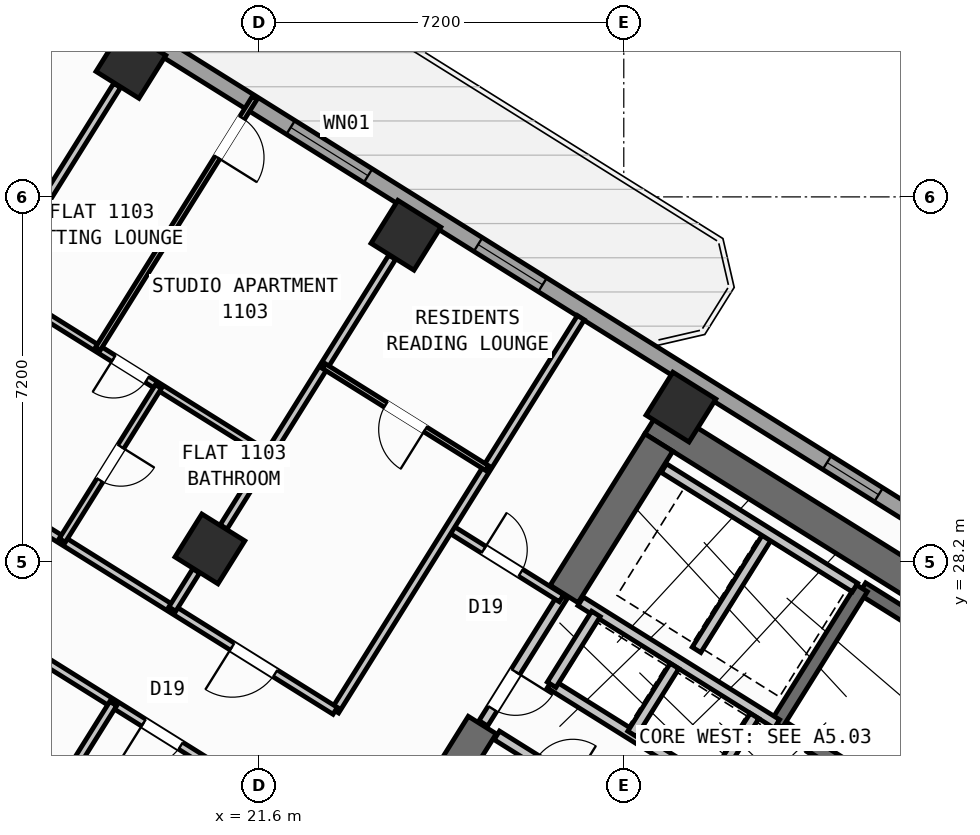
"""IFC4 building model, lengths in metres.
Left out: names, types, materials, properties, quantities, classifications, styles, units other than length and angle.
Written with IfcOpenShell. Run it as: python <this file> out.ifc"""

import sys

from ifc_helpers import new_model, si_unit, direction, frame, frame_2d, origin, origin_2d, place, context, subcontext, project, spatial, rectangle, hollow_rectangle, extrude, source, transform, mapped, element, fill, save


model = new_model("IFC4")
c1 = context("Model", 3, precision=1e-05, world=origin(), true_north=direction((0.0, 1.0)))
c2 = subcontext(c1, "Body", "Model", "MODEL_VIEW")
j1 = project(units=[si_unit("LENGTHUNIT", "METRE"), si_unit("PLANEANGLEUNIT", "RADIAN")], contexts=[c1])
p1 = place(None, origin())
s1 = spatial("IfcSite", under=j1, at=p1, CompositionType="ELEMENT")
p2 = place(p1, origin())
s2 = spatial("IfcBuilding", under=s1, at=p2, CompositionType="ELEMENT")
p3 = place(p2, frame((0.0, 0.0, 45.6)))
s3 = spatial("IfcBuildingStorey", under=s2, at=p3, CompositionType="ELEMENT", Elevation=45.6)
p4 = place(p3, frame((40.615, 23.983, 0.0), z_axis=(0.0, 0.0, 1.0), x_axis=(-0.848045953968, 0.529922692436, 0.0)))
e1 = element("IfcWall", 1, at=p4, inside=s3, PredefinedType="SHEAR", context=c2, shape_type="SweptSolid", body=[
    extrude(rectangle(XDim=13.24, YDim=0.65, at=frame_2d((6.62, 0.0))), origin(), (0.0, 0.0, 1.0), 3.35),
])
p5 = place(p3, frame((29.491, 30.552, 0.0), z_axis=(0.0, 0.0, 1.0), x_axis=(-0.529893103397, -0.8480644427, 0.0)))
e2 = element("IfcWall", 2, at=p5, inside=s3, PredefinedType="SHEAR", context=c2, shape_type="SweptSolid", body=[
    extrude(rectangle(XDim=3.525, YDim=0.65, at=frame_2d((1.763, 0.0))), origin(), (0.0, 0.0, 1.0), 3.35),
])
p6 = place(p3, frame((26.007, 24.976, 0.0), z_axis=(0.0, 0.0, 1.0), x_axis=(-0.529916319127, -0.848049936456, 0.0)))
e3 = element("IfcWall", 3, at=p6, inside=s3, PredefinedType="SHEAR", context=c2, shape_type="SweptSolid", body=[
    extrude(rectangle(XDim=6.375, YDim=0.65, at=frame_2d((3.188, 0.0))), origin(), (0.0, 0.0, 1.0), 3.35),
])
m1 = source(origin(), c2, "Body", "SweptSolid", [
    extrude(hollow_rectangle(XDim=1.0, YDim=1.0, WallThickness=0.04, at=origin_2d()), origin(), (0.0, 0.0, 1.0), 3.6),
])
for number, where, z_axis, x_axis in (
    (4, (29.928, 31.251, 0.0), (0.0, 0.0, 1.0), (-0.848, 0.53, 0.0)),
    (5, (24.5, 34.643, 0.0), (0.0, 0.0, 1.0), (-0.848, 0.53, 0.0)),
    (6, (20.632, 28.452, 0.0), (0.0, 0.0, 1.0), (-0.848, 0.53, 0.0)),
    (7, (19.073, 38.034, 0.0), (0.0, 0.0, 1.0), (-0.848, 0.53, 0.0)),
):
    element("IfcColumn", number, at=place(p3, frame(where, z_axis=z_axis, x_axis=x_axis)), inside=s3, PredefinedType="COLUMN", context=c2, shape_type="MappedRepresentation", body=[
        mapped(m1, transform((0.0, 0.0, 0.0), scale=1.0)),
    ])
p7 = place(p3, frame((14.138, 41.825, 0.0), z_axis=(0.0, 0.0, 1.0), x_axis=(0.848046498049, -0.529921821731, 0.0)))
e8 = element("IfcWall", 8, at=p7, inside=s3, PredefinedType="STANDARD", context=c2, shape_type="SweptSolid", body=[
    extrude(rectangle(XDim=31.588, YDim=0.32, at=frame_2d((15.794, 0.0))), origin(), (0.0, 0.0, 1.0), 3.35),
])
p8 = place(p7, frame((3.159, 0.0, 0.0)))
e9 = element("IfcOpeningElement", 9, at=p8, cuts=e8, PredefinedType="OPENING", context=c2, shape_type="SweptSolid", body=[
    extrude(rectangle(XDim=1.05, YDim=2.15, at=frame_2d((0.525, 1.075))), frame((0.0, 0.17, 0.0), z_axis=(0.0, -1.0, 0.0), x_axis=(1.0, 0.0, 0.0)), (0.0, 0.0, 1.0), 0.34),
])
p9 = place(p7, frame((0.906, 0.0, 1.0)))
e10 = element("IfcOpeningElement", 10, at=p9, cuts=e8, PredefinedType="OPENING", context=c2, shape_type="SweptSolid", body=[
    extrude(rectangle(XDim=0.9, YDim=1.25, at=frame_2d((0.45, 0.625))), frame((0.0, 0.17, 0.0), z_axis=(0.0, -1.0, 0.0), x_axis=(1.0, 0.0, 0.0)), (0.0, 0.0, 1.0), 0.34),
])
p10 = place(p7, frame((9.537, 0.0, 0.85)))
e11 = element("IfcOpeningElement", 11, at=p10, cuts=e8, PredefinedType="OPENING", context=c2, shape_type="SweptSolid", body=[
    extrude(rectangle(XDim=1.8, YDim=1.5, at=frame_2d((0.9, 0.75))), frame((0.0, 0.17, 0.0), z_axis=(0.0, -1.0, 0.0), x_axis=(1.0, 0.0, 0.0)), (0.0, 0.0, 1.0), 0.34),
])
p11 = place(p7, frame((13.899, 0.0, 0.85)))
e12 = element("IfcOpeningElement", 12, at=p11, cuts=e8, PredefinedType="OPENING", context=c2, shape_type="SweptSolid", body=[
    extrude(rectangle(XDim=1.5, YDim=1.5, at=frame_2d((0.75, 0.75))), frame((0.0, 0.17, 0.0), z_axis=(0.0, -1.0, 0.0), x_axis=(1.0, 0.0, 0.0)), (0.0, 0.0, 1.0), 0.34),
])
p12 = place(p7, frame((22.019, 0.0, 0.95)))
e13 = element("IfcOpeningElement", 13, at=p12, cuts=e8, PredefinedType="OPENING", context=c2, shape_type="SweptSolid", body=[
    extrude(rectangle(XDim=1.2, YDim=1.4, at=frame_2d((0.6, 0.7))), frame((0.0, 0.17, 0.0), z_axis=(0.0, -1.0, 0.0), x_axis=(1.0, 0.0, 0.0)), (0.0, 0.0, 1.0), 0.34),
])
p13 = place(p7, frame((27.569, 0.0, 0.95)))
e14 = element("IfcOpeningElement", 14, at=p13, cuts=e8, PredefinedType="OPENING", context=c2, shape_type="SweptSolid", body=[
    extrude(rectangle(XDim=1.2, YDim=1.4, at=frame_2d((0.6, 0.7))), frame((0.0, 0.17, 0.0), z_axis=(0.0, -1.0, 0.0), x_axis=(1.0, 0.0, 0.0)), (0.0, 0.0, 1.0), 0.34),
])
p14 = place(p3, frame((39.721, 23.788, 0.0), z_axis=(0.0, 0.0, 1.0), x_axis=(-0.848054434086, 0.529909121291, 0.0)))
e15 = element("IfcWall", 15, at=p14, inside=s3, PredefinedType="SHEAR", context=c2, shape_type="SweptSolid", body=[
    extrude(rectangle(XDim=7.33, YDim=0.26, at=frame_2d((3.665, 0.0))), origin(), (0.0, 0.0, 1.0), 3.35),
])
p15 = place(p3, frame((38.046, 21.108, 0.0), z_axis=(0.0, 0.0, 1.0), x_axis=(-0.848054434086, 0.529909121291, 0.0)))
e16 = element("IfcWall", 16, at=p15, inside=s3, PredefinedType="SHEAR", context=c2, shape_type="SweptSolid", body=[
    extrude(rectangle(XDim=7.33, YDim=0.26, at=frame_2d((3.665, 0.0))), origin(), (0.0, 0.0, 1.0), 3.35),
])
p16 = place(p15, frame((0.22, 0.0, 0.0)))
e17 = element("IfcOpeningElement", 17, at=p16, cuts=e16, PredefinedType="OPENING", context=c2, shape_type="SweptSolid", body=[
    extrude(rectangle(XDim=1.1, YDim=2.1, at=frame_2d((0.55, 1.05))), frame((0.0, 0.14, 0.0), z_axis=(0.0, -1.0, 0.0), x_axis=(1.0, 0.0, 0.0)), (0.0, 0.0, 1.0), 0.28),
])
p17 = place(p3, frame((33.496, 27.677, 0.0), z_axis=(0.0, 0.0, 1.0), x_axis=(-0.529908658664, -0.84805472316, 0.0)))
e18 = element("IfcWall", 18, at=p17, inside=s3, PredefinedType="SHEAR", context=c2, shape_type="SweptSolid", body=[
    extrude(rectangle(XDim=3.16, YDim=0.26, at=frame_2d((1.58, 0.0))), origin(), (0.0, 0.0, 1.0), 3.35),
])
p18 = place(p3, frame((31.822, 24.998, 0.0), z_axis=(0.0, 0.0, 1.0), x_axis=(-0.848058348634, 0.529902856485, 0.0)))
e19 = element("IfcWall", 19, at=p18, inside=s3, PredefinedType="STANDARD", context=c2, shape_type="SweptSolid", body=[
    extrude(rectangle(XDim=4.568, YDim=0.2, at=frame_2d((2.284, 0.0))), origin(), (0.0, 0.0, 1.0), 3.34),
])
p19 = place(p3, frame((32.108, 22.814, 0.0), z_axis=(0.0, 0.0, 1.0), x_axis=(-0.848042229521, 0.529928652696, 0.0)))
e20 = element("IfcWall", 20, at=p19, inside=s3, PredefinedType="STANDARD", context=c2, shape_type="SweptSolid", body=[
    extrude(rectangle(XDim=5.62, YDim=0.2, at=frame_2d((2.81, 0.0))), origin(), (0.0, 0.0, 1.0), 3.34),
])
p20 = place(p3, frame((28.25, 27.17, 0.0), z_axis=(0.0, 0.0, 1.0), x_axis=(-0.529905827651, -0.848056492117, 0.0)))
e21 = element("IfcWall", 21, at=p20, inside=s3, PredefinedType="STANDARD", context=c2, shape_type="SweptSolid", body=[
    extrude(rectangle(XDim=1.65, YDim=0.2, at=frame_2d((0.825, 0.0))), origin(), (0.0, 0.0, 1.0), 3.34),
])
p21 = place(p3, frame((31.645, 28.716, 0.0), z_axis=(0.0, 0.0, 1.0), x_axis=(-0.52986693015, -0.848080795876, 0.0)))
e22 = element("IfcWall", 22, at=p21, inside=s3, PredefinedType="STANDARD", context=c2, shape_type="SweptSolid", body=[
    extrude(rectangle(XDim=2.66, YDim=0.2, at=frame_2d((1.33, 0.0))), origin(), (0.0, 0.0, 1.0), 3.34),
])
p22 = place(p3, frame((33.363, 27.69, 0.0), z_axis=(0.0, 0.0, 1.0), x_axis=(-0.848053806312, 0.529910125964, 0.0)))
e23 = element("IfcWall", 23, at=p22, inside=s3, PredefinedType="STANDARD", context=c2, shape_type="SweptSolid", body=[
    extrude(rectangle(XDim=4.448, YDim=0.2, at=frame_2d((2.224, 0.0))), origin(), (0.0, 0.0, 1.0), 3.34),
])
for number, where, z_axis, x_axis in (
    (24, (31.379, 25.156, 0.0), (0.0, 0.0, 1.0), (-0.53, -0.848, 0.0)),
    (25, (29.801, 26.142, 0.0), (0.0, 0.0, 1.0), (-0.53, -0.848, 0.0)),
):
    element("IfcWall", number, at=place(p3, frame(where, z_axis=z_axis, x_axis=x_axis)), inside=s3, PredefinedType="STANDARD", context=c2, shape_type="SweptSolid", body=[
        extrude(rectangle(XDim=1.58, YDim=0.2, at=frame_2d((0.79, 0.0))), origin(), (0.0, 0.0, 1.0), 3.34),
    ])
p23 = place(p3, frame((31.525, 21.504, 0.0), z_axis=(0.0, 0.0, 1.0), x_axis=(-0.848044998614, 0.529924221305, 0.0)))
e26 = element("IfcWall", 26, at=p23, inside=s3, PredefinedType="STANDARD", context=c2, shape_type="SweptSolid", body=[
    extrude(rectangle(XDim=6.168, YDim=0.2, at=frame_2d((3.084, 0.0))), origin(), (0.0, 0.0, 1.0), 3.34),
])
p24 = place(p23, frame((4.4, 0.0, 0.0)))
e27 = element("IfcOpeningElement", 27, at=p24, cuts=e26, PredefinedType="OPENING", context=c2, shape_type="SweptSolid", body=[
    extrude(rectangle(XDim=0.86, YDim=2.05, at=frame_2d((0.43, 1.025))), frame((0.0, 0.11, 0.0), z_axis=(0.0, -1.0, 0.0), x_axis=(1.0, 0.0, 0.0)), (0.0, 0.0, 1.0), 0.22),
])
p25 = place(p23, frame((0.35, 0.0, 0.0)))
e28 = element("IfcOpeningElement", 28, at=p25, cuts=e26, PredefinedType="OPENING", context=c2, shape_type="SweptSolid", body=[
    extrude(rectangle(XDim=0.86, YDim=2.05, at=frame_2d((0.43, 1.025))), frame((0.0, 0.11, 0.0), z_axis=(0.0, -1.0, 0.0), x_axis=(1.0, 0.0, 0.0)), (0.0, 0.0, 1.0), 0.22),
])
p26 = place(p3, frame((27.596, 27.52, 0.0), z_axis=(0.0, 0.0, 1.0), x_axis=(-0.529865479138, -0.848081702443, 0.0)))
e29 = element("IfcWall", 29, at=p26, inside=s3, PredefinedType="STANDARD", context=c2, shape_type="SweptSolid", body=[
    extrude(rectangle(XDim=2.96, YDim=0.2, at=frame_2d((1.48, 0.0))), origin(), (0.0, 0.0, 1.0), 3.34),
])
p27 = place(p26, frame((1.76, 0.0, 0.0)))
e30 = element("IfcOpeningElement", 30, at=p27, cuts=e29, PredefinedType="OPENING", context=c2, shape_type="SweptSolid", body=[
    extrude(rectangle(XDim=0.86, YDim=2.05, at=frame_2d((0.43, 1.025))), frame((0.0, 0.11, 0.0), z_axis=(0.0, -1.0, 0.0), x_axis=(1.0, 0.0, 0.0)), (0.0, 0.0, 1.0), 0.22),
])
p28 = place(p3, frame((27.57, 27.478, 0.0), z_axis=(0.0, 0.0, 1.0), x_axis=(-0.848050851465, 0.529914854792, 0.0)))
e31 = element("IfcWall", 31, at=p28, inside=s3, PredefinedType="PARTITIONING", context=c2, shape_type="SweptSolid", body=[
    extrude(rectangle(XDim=2.61, YDim=0.16, at=frame_2d((1.305, 0.0))), origin(), (0.0, 0.0, 1.0), 3.34),
])
p29 = place(p28, frame((0.95, 0.0, 0.0)))
e32 = element("IfcOpeningElement", 32, at=p29, cuts=e31, PredefinedType="OPENING", context=c2, shape_type="SweptSolid", body=[
    extrude(rectangle(XDim=0.86, YDim=2.05, at=frame_2d((0.43, 1.025))), frame((0.0, 0.09, 0.0), z_axis=(0.0, -1.0, 0.0), x_axis=(1.0, 0.0, 0.0)), (0.0, 0.0, 1.0), 0.18),
])
p30 = place(p3, frame((27.953, 33.016, 0.0), z_axis=(0.0, 0.0, 1.0), x_axis=(-0.529903001606, -0.848058257957, 0.0)))
e33 = element("IfcWall", 33, at=p30, inside=s3, PredefinedType="PARTITIONING", context=c2, shape_type="SweptSolid", body=[
    extrude(rectangle(XDim=9.15, YDim=0.16, at=frame_2d((4.575, 0.0))), origin(), (0.0, 0.0, 1.0), 3.34),
])
p31 = place(p3, frame((23.104, 25.256, 0.0), z_axis=(0.0, 0.0, 1.0), x_axis=(-0.848041752158, 0.529929416617, 0.0)))
e34 = element("IfcWall", 34, at=p31, inside=s3, PredefinedType="PARTITIONING", context=c2, shape_type="SweptSolid", body=[
    extrude(rectangle(XDim=16.73, YDim=0.16, at=frame_2d((8.365, 0.0))), origin(), (0.0, 0.0, 1.0), 3.34),
])
p32 = place(p31, frame((1.395, 0.0, 0.0)))
e35 = element("IfcOpeningElement", 35, at=p32, cuts=e34, PredefinedType="OPENING", context=c2, shape_type="SweptSolid", body=[
    extrude(rectangle(XDim=1.0, YDim=2.1, at=frame_2d((0.5, 1.05))), frame((0.0, 0.09, 0.0), z_axis=(0.0, -1.0, 0.0), x_axis=(1.0, 0.0, 0.0)), (0.0, 0.0, 1.0), 0.18),
])
p33 = place(p31, frame((7.82, 0.0, 0.0)))
e36 = element("IfcOpeningElement", 36, at=p33, cuts=e34, PredefinedType="OPENING", context=c2, shape_type="SweptSolid", body=[
    extrude(rectangle(XDim=1.0, YDim=2.1, at=frame_2d((0.5, 1.05))), frame((0.0, 0.09, 0.0), z_axis=(0.0, -1.0, 0.0), x_axis=(1.0, 0.0, 0.0)), (0.0, 0.0, 1.0), 0.18),
])
p34 = place(p31, frame((14.76, 0.0, 0.0)))
e37 = element("IfcOpeningElement", 37, at=p34, cuts=e34, PredefinedType="OPENING", context=c2, shape_type="SweptSolid", body=[
    extrude(rectangle(XDim=1.0, YDim=2.1, at=frame_2d((0.5, 1.05))), frame((0.0, 0.09, 0.0), z_axis=(0.0, -1.0, 0.0), x_axis=(1.0, 0.0, 0.0)), (0.0, 0.0, 1.0), 0.18),
])
p35 = place(p3, frame((21.938, 23.391, 0.0), z_axis=(0.0, 0.0, 1.0), x_axis=(-0.848045850158, 0.529922858565, 0.0)))
e38 = element("IfcWall", 38, at=p35, inside=s3, PredefinedType="PARTITIONING", context=c2, shape_type="SweptSolid", body=[
    extrude(rectangle(XDim=16.73, YDim=0.16, at=frame_2d((8.365, 0.0))), origin(), (0.0, 0.0, 1.0), 3.34),
])
p36 = place(p35, frame((2.22, 0.0, 0.0)))
e39 = element("IfcOpeningElement", 39, at=p36, cuts=e38, PredefinedType="OPENING", context=c2, shape_type="SweptSolid", body=[
    extrude(rectangle(XDim=0.86, YDim=2.05, at=frame_2d((0.43, 1.025))), frame((0.0, 0.09, 0.0), z_axis=(0.0, -1.0, 0.0), x_axis=(1.0, 0.0, 0.0)), (0.0, 0.0, 1.0), 0.18),
])
p37 = place(p35, frame((6.49, 0.0, 0.0)))
e40 = element("IfcOpeningElement", 40, at=p37, cuts=e38, PredefinedType="OPENING", context=c2, shape_type="SweptSolid", body=[
    extrude(rectangle(XDim=1.0, YDim=2.1, at=frame_2d((0.5, 1.05))), frame((0.0, 0.09, 0.0), z_axis=(0.0, -1.0, 0.0), x_axis=(1.0, 0.0, 0.0)), (0.0, 0.0, 1.0), 0.18),
])
p38 = place(p35, frame((11.14, 0.0, 0.0)))
e41 = element("IfcOpeningElement", 41, at=p38, cuts=e38, PredefinedType="OPENING", context=c2, shape_type="SweptSolid", body=[
    extrude(rectangle(XDim=1.0, YDim=2.1, at=frame_2d((0.5, 1.05))), frame((0.0, 0.09, 0.0), z_axis=(0.0, -1.0, 0.0), x_axis=(1.0, 0.0, 0.0)), (0.0, 0.0, 1.0), 0.18),
])
p39 = place(p3, frame((18.724, 25.399, 0.0), z_axis=(0.0, 0.0, 1.0), x_axis=(-0.529930102756, -0.848041323399, 0.0)))
e42 = element("IfcWall", 42, at=p39, inside=s3, PredefinedType="PARTITIONING", context=c2, shape_type="SweptSolid", body=[
    extrude(rectangle(XDim=3.188, YDim=0.16, at=frame_2d((1.594, 0.0))), origin(), (0.0, 0.0, 1.0), 2.725),
])
p40 = place(p3, frame((24.229, 34.209, 0.0), z_axis=(0.0, 0.0, 1.0), x_axis=(-0.529897533635, -0.848061674554, 0.0)))
e43 = element("IfcWall", 43, at=p40, inside=s3, PredefinedType="PARTITIONING", context=c2, shape_type="SweptSolid", body=[
    extrude(rectangle(XDim=6.276, YDim=0.16, at=frame_2d((3.138, 0.0))), origin(), (0.0, 0.0, 1.0), 2.725),
])
p41 = place(p3, frame((20.361, 28.018, 0.0), z_axis=(0.0, 0.0, 1.0), x_axis=(-0.529900064649, -0.848060093086, 0.0)))
e44 = element("IfcWall", 44, at=p41, inside=s3, PredefinedType="PARTITIONING", context=c2, shape_type="SweptSolid", body=[
    extrude(rectangle(XDim=0.888, YDim=0.16, at=frame_2d((0.444, 0.0))), origin(), (0.0, 0.0, 1.0), 2.725),
])
p42 = place(p3, frame((26.099, 30.05, 0.0), z_axis=(0.0, 0.0, 1.0), x_axis=(-0.84803087207, 0.529946827537, 0.0)))
e45 = element("IfcWall", 45, at=p42, inside=s3, PredefinedType="PARTITIONING", context=c2, shape_type="SweptSolid", body=[
    extrude(rectangle(XDim=3.79, YDim=0.11, at=frame_2d((1.895, 0.0))), origin(), (0.0, 0.0, 1.0), 3.34),
])
p43 = place(p42, frame((1.435, 0.0, 0.0)))
e46 = element("IfcOpeningElement", 46, at=p43, cuts=e45, PredefinedType="OPENING", context=c2, shape_type="SweptSolid", body=[
    extrude(rectangle(XDim=0.92, YDim=2.08, at=frame_2d((0.46, 1.04))), frame((0.0, 0.065, 0.0), z_axis=(0.0, -1.0, 0.0), x_axis=(1.0, 0.0, 0.0)), (0.0, 0.0, 1.0), 0.13),
])
p44 = place(p3, frame((18.802, 37.6, 0.0), z_axis=(0.0, 0.0, 1.0), x_axis=(-0.529915015264, -0.848050751193, 0.0)))
e47 = element("IfcWall", 47, at=p44, inside=s3, PredefinedType="PARTITIONING", context=c2, shape_type="SweptSolid", body=[
    extrude(rectangle(XDim=6.276, YDim=0.16, at=frame_2d((3.138, 0.0))), origin(), (0.0, 0.0, 1.0), 2.725),
])
p45 = place(p3, frame((21.787, 30.301, 0.0), z_axis=(0.0, 0.0, 1.0), x_axis=(-0.848049732085, 0.529916646191, 0.0)))
e48 = element("IfcWall", 48, at=p45, inside=s3, PredefinedType="PLUMBINGWALL", context=c2, shape_type="SweptSolid", body=[
    extrude(rectangle(XDim=6.4, YDim=0.14, at=frame_2d((3.2, 0.0))), origin(), (0.0, 0.0, 1.0), 3.34),
])
p46 = place(p45, frame((2.824, 0.0, 0.0)))
e49 = element("IfcOpeningElement", 49, at=p46, cuts=e48, PredefinedType="OPENING", context=c2, shape_type="SweptSolid", body=[
    extrude(rectangle(XDim=0.78, YDim=2.05, at=frame_2d((0.39, 1.025))), frame((0.0, 0.08, 0.0), z_axis=(0.0, -1.0, 0.0), x_axis=(1.0, 0.0, 0.0)), (0.0, 0.0, 1.0), 0.16),
])
p47 = place(p3, frame((19.616, 31.657, 0.0), z_axis=(0.0, 0.0, 1.0), x_axis=(-0.529876336437, -0.84807491891, 0.0)))
e50 = element("IfcWall", 50, at=p47, inside=s3, PredefinedType="PLUMBINGWALL", context=c2, shape_type="SweptSolid", body=[
    extrude(rectangle(XDim=3.58, YDim=0.14, at=frame_2d((1.79, 0.0))), origin(), (0.0, 0.0, 1.0), 3.34),
])
p48 = place(p47, frame((1.4, 0.0, 0.0)))
e51 = element("IfcOpeningElement", 51, at=p48, cuts=e50, PredefinedType="OPENING", context=c2, shape_type="SweptSolid", body=[
    extrude(rectangle(XDim=0.78, YDim=2.05, at=frame_2d((0.39, 1.025))), frame((0.0, 0.08, 0.0), z_axis=(0.0, -1.0, 0.0), x_axis=(1.0, 0.0, 0.0)), (0.0, 0.0, 1.0), 0.16),
])
p49 = place(p3, frame((21.517, 37.356, 0.0), z_axis=(0.0, 0.0, 1.0), x_axis=(-0.529916267533, -0.848049968695, 0.0)))
e52 = element("IfcWall", 52, at=p49, inside=s3, PredefinedType="PARTITIONING", context=c2, shape_type="SweptSolid", body=[
    extrude(rectangle(XDim=5.84, YDim=0.11, at=frame_2d((2.92, 0.0))), origin(), (0.0, 0.0, 1.0), 3.34),
])
p50 = place(p49, frame((0.47, 0.0, 0.0)))
e53 = element("IfcOpeningElement", 53, at=p50, cuts=e52, PredefinedType="OPENING", context=c2, shape_type="SweptSolid", body=[
    extrude(rectangle(XDim=0.92, YDim=2.08, at=frame_2d((0.46, 1.04))), frame((0.0, 0.065, 0.0), z_axis=(0.0, -1.0, 0.0), x_axis=(1.0, 0.0, 0.0)), (0.0, 0.0, 1.0), 0.13),
])
m2 = source(origin(), c2, "Body", "SweptSolid", [
    extrude(rectangle(XDim=1.8, YDim=1.5, at=frame_2d((0.9, 0.75))), frame((0.0, 0.03, 0.0), z_axis=(0.0, -1.0, 0.0), x_axis=(1.0, 0.0, 0.0)), (0.0, 0.0, 1.0), 0.06),
])
p51 = place(p10, origin())
e54 = element("IfcWindow", 54, at=p51, inside=s3, PartitioningType="SINGLE_PANEL", PredefinedType="WINDOW", context=c2, shape_type="MappedRepresentation", body=[
    mapped(m2, transform((0.0, 0.0, 0.0), scale=1.0)),
])
fill(e11, e54)
m3 = source(origin(), c2, "Body", "SweptSolid", [
    extrude(rectangle(XDim=1.5, YDim=1.5, at=frame_2d((0.75, 0.75))), frame((0.0, 0.03, 0.0), z_axis=(0.0, -1.0, 0.0), x_axis=(1.0, 0.0, 0.0)), (0.0, 0.0, 1.0), 0.06),
])
p52 = place(p11, origin())
e55 = element("IfcWindow", 55, at=p52, inside=s3, PartitioningType="SINGLE_PANEL", PredefinedType="WINDOW", context=c2, shape_type="MappedRepresentation", body=[
    mapped(m3, transform((0.0, 0.0, 0.0), scale=1.0)),
])
fill(e12, e55)
m4 = source(origin(), c2, "Body", "SweptSolid", [
    extrude(rectangle(XDim=1.2, YDim=1.4, at=frame_2d((0.6, 0.7))), frame((0.0, 0.03, 0.0), z_axis=(0.0, -1.0, 0.0), x_axis=(1.0, 0.0, 0.0)), (0.0, 0.0, 1.0), 0.06),
])
p53 = place(p12, origin())
e56 = element("IfcWindow", 56, at=p53, inside=s3, PartitioningType="SINGLE_PANEL", PredefinedType="WINDOW", context=c2, shape_type="MappedRepresentation", body=[
    mapped(m4, transform((0.0, 0.0, 0.0), scale=1.0)),
])
fill(e13, e56)
m5 = source(origin(), c2, "Body", "SweptSolid", [
    extrude(rectangle(XDim=0.86, YDim=2.05, at=frame_2d((0.43, 1.025))), frame((0.0, 0.025, 0.0), z_axis=(0.0, -1.0, 0.0), x_axis=(1.0, 0.0, 0.0)), (0.0, 0.0, 1.0), 0.05),
])
p54 = place(p29, frame((0.86, 0.0, 0.0), z_axis=(0.0, 0.0, 1.0), x_axis=(-1.0, 0.0, 0.0)))
e57 = element("IfcDoor", 57, at=p54, inside=s3, OperationType="SINGLE_SWING_LEFT", PredefinedType="DOOR", context=c2, shape_type="MappedRepresentation", body=[
    mapped(m5, transform((0.0, 0.0, 0.0), scale=1.0)),
])
fill(e32, e57)
p55 = place(p27, origin())
e58 = element("IfcDoor", 58, at=p55, inside=s3, OperationType="SINGLE_SWING_LEFT", PredefinedType="DOOR", context=c2, shape_type="MappedRepresentation", body=[
    mapped(m5, transform((0.0, 0.0, 0.0), scale=1.0)),
])
fill(e30, e58)
p56 = place(p36, origin())
e59 = element("IfcDoor", 59, at=p56, inside=s3, OperationType="SINGLE_SWING_RIGHT", PredefinedType="DOOR", context=c2, shape_type="MappedRepresentation", body=[
    mapped(m5, transform((0.0, 0.0, 0.0), scale=1.0)),
])
fill(e39, e59)
m6 = source(origin(), c2, "Body", "SweptSolid", [
    extrude(rectangle(XDim=1.0, YDim=2.1, at=frame_2d((0.5, 1.05))), frame((0.0, 0.025, 0.0), z_axis=(0.0, -1.0, 0.0), x_axis=(1.0, 0.0, 0.0)), (0.0, 0.0, 1.0), 0.05),
])
p57 = place(p32, origin())
e60 = element("IfcDoor", 60, at=p57, inside=s3, OperationType="SINGLE_SWING_RIGHT", PredefinedType="DOOR", context=c2, shape_type="MappedRepresentation", body=[
    mapped(m6, transform((0.0, 0.0, 0.0), scale=1.0)),
])
fill(e35, e60)
m7 = source(origin(), c2, "Body", "SweptSolid", [
    extrude(rectangle(XDim=0.92, YDim=2.08, at=frame_2d((0.46, 1.04))), frame((0.0, 0.025, 0.0), z_axis=(0.0, -1.0, 0.0), x_axis=(1.0, 0.0, 0.0)), (0.0, 0.0, 1.0), 0.05),
])
p58 = place(p43, origin())
e61 = element("IfcDoor", 61, at=p58, inside=s3, OperationType="SINGLE_SWING_LEFT", PredefinedType="DOOR", context=c2, shape_type="MappedRepresentation", body=[
    mapped(m7, transform((0.0, 0.0, 0.0), scale=1.0)),
])
fill(e46, e61)
p59 = place(p50, origin())
e62 = element("IfcDoor", 62, at=p59, inside=s3, OperationType="SINGLE_SWING_RIGHT", PredefinedType="DOOR", context=c2, shape_type="MappedRepresentation", body=[
    mapped(m7, transform((0.0, 0.0, 0.0), scale=1.0)),
])
fill(e53, e62)
m8 = source(origin(), c2, "Body", "SweptSolid", [
    extrude(rectangle(XDim=0.78, YDim=2.05, at=frame_2d((0.39, 1.025))), frame((0.0, 0.025, 0.0), z_axis=(0.0, -1.0, 0.0), x_axis=(1.0, 0.0, 0.0)), (0.0, 0.0, 1.0), 0.05),
])
p60 = place(p46, origin())
e63 = element("IfcDoor", 63, at=p60, inside=s3, OperationType="SINGLE_SWING_RIGHT", PredefinedType="DOOR", context=c2, shape_type="MappedRepresentation", body=[
    mapped(m8, transform((0.0, 0.0, 0.0), scale=1.0)),
])
fill(e49, e63)
p61 = place(p48, origin())
e64 = element("IfcDoor", 64, at=p61, inside=s3, OperationType="SINGLE_SWING_LEFT", PredefinedType="DOOR", context=c2, shape_type="MappedRepresentation", body=[
    mapped(m8, transform((0.0, 0.0, 0.0), scale=1.0)),
])
fill(e51, e64)
save(model, sys.argv[1])
